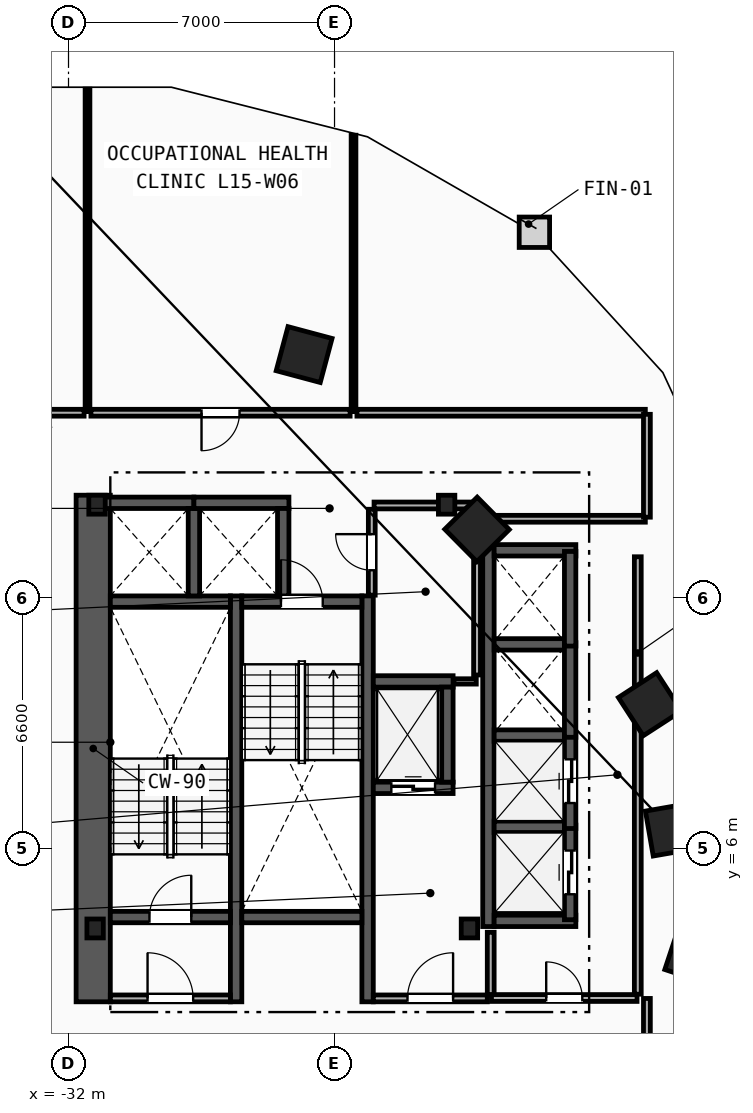
"""IFC4 building model, lengths in metres.
Left out: names, types, materials, properties, quantities, classifications, styles, units other than length and angle.
Written with IfcOpenShell. Run it as: python <this file> out.ifc"""

import sys

from ifc_helpers import new_model, si_unit, direction, frame, frame_2d, origin, origin_2d, place, context, subcontext, project, spatial, rectangle, i_section, extrude, element, fill, save


model = new_model("IFC4")
c1 = context("Model", 3, precision=1e-05, world=origin(), true_north=direction((0.0, 1.0)))
c2 = subcontext(c1, "Body", "Model", "MODEL_VIEW")
j1 = project(units=[si_unit("LENGTHUNIT", "METRE"), si_unit("PLANEANGLEUNIT", "RADIAN")], contexts=[c1])
p1 = place(None, origin())
s1 = spatial("IfcSite", under=j1, at=p1, CompositionType="ELEMENT")
p2 = place(p1, origin())
s2 = spatial("IfcBuilding", under=s1, at=p2, CompositionType="ELEMENT")
p3 = place(p2, frame((0.0, 0.0, 62.0)))
s3 = spatial("IfcBuildingStorey", under=s2, at=p3, CompositionType="ELEMENT", Elevation=62.0)
for number, where, z_axis, x_axis in (
    (1, (-31.3, 3.9, 0.0), (0.0, 0.0, 1.0), (1.0, 0.0, 0.0)),
    (2, (-21.45, 3.9, 0.0), (0.0, 0.0, 1.0), (1.0, 0.0, 0.0)),
    (3, (-22.05, 15.05, 0.0), (0.0, 0.0, 1.0), (1.0, 0.0, 0.0)),
    (4, (-31.25, 15.05, 0.0), (0.0, 0.0, 1.0), (1.0, 0.0, 0.0)),
):
    element("IfcColumn", number, at=place(p3, frame(where, z_axis=z_axis, x_axis=x_axis)), inside=s3, PredefinedType="COLUMN", context=c2, shape_type="SweptSolid", body=[
        extrude(i_section(OverallWidth=0.432, OverallDepth=0.498, WebThickness=0.056, FlangeThickness=0.089, FilletRadius=0.018, at=origin_2d()), origin(), (0.0, 0.0, 1.0), 3.8),
    ])
for number, where, z_axis, x_axis in (
    (5, (-15.55, 3.2, 0.0), (0.0, 0.0, 1.0), (0.315, 0.949, 0.0)),
    (6, (-16.125, 6.5, 0.0), (0.0, 0.0, 1.0), (-0.172, 0.985, 0.0)),
    (7, (-16.7, 9.8, 0.0), (0.0, 0.0, 1.0), (-0.544, 0.839, 0.0)),
    (8, (-21.25, 14.4, 0.0), (0.0, 0.0, 1.0), (-0.703, 0.711, 0.0)),
    (9, (-25.8, 19.0, 0.0), (0.0, 0.0, 1.0), (-0.966, 0.259, 0.0)),
):
    element("IfcColumn", number, at=place(p3, frame(where, z_axis=z_axis, x_axis=x_axis)), inside=s3, PredefinedType="COLUMN", context=c2, shape_type="SweptSolid", body=[
        extrude(rectangle(XDim=1.2, YDim=1.2, at=origin_2d()), origin(), (0.0, 0.0, 1.0), 3.8),
    ])
p4 = place(p3, frame((-31.35, 1.97, 0.0), z_axis=(0.0, 0.0, 1.0), x_axis=(0.0, 1.0, 0.0)))
e10 = element("IfcWall", 10, at=p4, inside=s3, PredefinedType="SHEAR", context=c2, shape_type="SweptSolid", body=[
    extrude(rectangle(XDim=13.33, YDim=0.9, at=frame_2d((6.665, 0.0))), origin(), (0.0, 0.0, 1.0), 3.5),
])
for number, where, z_axis, x_axis in (
    (11, (-27.59, 1.97, 0.0), (0.0, 0.0, 1.0), (0.0, 1.0, 0.0)),
    (12, (-24.13, 1.97, 0.0), (0.0, 0.0, 1.0), (0.0, 1.0, 0.0)),
):
    element("IfcWall", number, at=place(p3, frame(where, z_axis=z_axis, x_axis=x_axis)), inside=s3, PredefinedType="SHEAR", context=c2, shape_type="SweptSolid", body=[
        extrude(rectangle(XDim=10.68, YDim=0.3, at=frame_2d((5.34, 0.0))), origin(), (0.0, 0.0, 1.0), 3.5),
    ])
p5 = place(p3, frame((-30.9, 4.2, 0.0), z_axis=(0.0, 0.0, 1.0), x_axis=(1.0, 0.0, 0.0)))
e13 = element("IfcWall", 13, at=p5, inside=s3, PredefinedType="SHEAR", context=c2, shape_type="SweptSolid", body=[
    extrude(rectangle(XDim=3.16, YDim=0.3, at=frame_2d((1.58, 0.0))), origin(), (0.0, 0.0, 1.0), 3.5),
])
p6 = place(p5, frame((1.03, 0.0, 0.0)))
e14 = element("IfcOpeningElement", 14, at=p6, cuts=e13, PredefinedType="OPENING", context=c2, shape_type="SweptSolid", body=[
    extrude(rectangle(XDim=1.1, YDim=2.15, at=frame_2d((0.55, 1.075))), frame((0.0, 0.16, 0.0), z_axis=(0.0, -1.0, 0.0), x_axis=(1.0, 0.0, 0.0)), (0.0, 0.0, 1.0), 0.32),
])
p7 = place(p3, frame((-30.9, 12.5, 0.0), z_axis=(0.0, 0.0, 1.0), x_axis=(1.0, 0.0, 0.0)))
e15 = element("IfcWall", 15, at=p7, inside=s3, PredefinedType="SHEAR", context=c2, shape_type="SweptSolid", body=[
    extrude(rectangle(XDim=3.16, YDim=0.3, at=frame_2d((1.58, 0.0))), origin(), (0.0, 0.0, 1.0), 3.5),
])
p8 = place(p3, frame((-27.44, 12.5, 0.0), z_axis=(0.0, 0.0, 1.0), x_axis=(1.0, 0.0, 0.0)))
e16 = element("IfcWall", 16, at=p8, inside=s3, PredefinedType="SHEAR", context=c2, shape_type="SweptSolid", body=[
    extrude(rectangle(XDim=3.16, YDim=0.3, at=frame_2d((1.58, 0.0))), origin(), (0.0, 0.0, 1.0), 3.5),
])
p9 = place(p8, frame((1.03, 0.0, 0.0)))
e17 = element("IfcOpeningElement", 17, at=p9, cuts=e16, PredefinedType="OPENING", context=c2, shape_type="SweptSolid", body=[
    extrude(rectangle(XDim=1.1, YDim=2.15, at=frame_2d((0.55, 1.075))), frame((0.0, 0.16, 0.0), z_axis=(0.0, -1.0, 0.0), x_axis=(1.0, 0.0, 0.0)), (0.0, 0.0, 1.0), 0.32),
])
p10 = place(p3, frame((-27.44, 4.2, 0.0), z_axis=(0.0, 0.0, 1.0), x_axis=(1.0, 0.0, 0.0)))
e18 = element("IfcWall", 18, at=p10, inside=s3, PredefinedType="SHEAR", context=c2, shape_type="SweptSolid", body=[
    extrude(rectangle(XDim=3.16, YDim=0.3, at=frame_2d((1.58, 0.0))), origin(), (0.0, 0.0, 1.0), 3.5),
])
p11 = place(p3, frame((-20.89, 2.15, 0.0), z_axis=(0.0, 0.0, 1.0), x_axis=(0.0, 1.0, 0.0)))
e19 = element("IfcWall", 19, at=p11, inside=s3, PredefinedType="PARTITIONING", context=c2, shape_type="SweptSolid", body=[
    extrude(rectangle(XDim=1.65, YDim=0.18, at=frame_2d((0.825, 0.0))), origin(), (0.0, 0.0, 1.0), 3.5),
])
p12 = place(p3, frame((-23.98, 2.06, 0.0), z_axis=(0.0, 0.0, 1.0), x_axis=(1.0, 0.0, 0.0)))
e20 = element("IfcWall", 20, at=p12, inside=s3, PredefinedType="PARTITIONING", context=c2, shape_type="SweptSolid", body=[
    extrude(rectangle(XDim=3.0, YDim=0.18, at=frame_2d((1.5, 0.0))), origin(), (0.0, 0.0, 1.0), 3.5),
])
p13 = place(p12, frame((0.9, 0.0, 0.0)))
e21 = element("IfcOpeningElement", 21, at=p13, cuts=e20, PredefinedType="OPENING", context=c2, shape_type="SweptSolid", body=[
    extrude(rectangle(XDim=1.2, YDim=2.15, at=frame_2d((0.6, 1.075))), frame((0.0, 0.1, 0.0), z_axis=(0.0, -1.0, 0.0), x_axis=(1.0, 0.0, 0.0)), (0.0, 0.0, 1.0), 0.2),
])
p14 = place(p3, frame((-30.9, 2.06, 0.0), z_axis=(0.0, 0.0, 1.0), x_axis=(1.0, 0.0, 0.0)))
e22 = element("IfcWall", 22, at=p14, inside=s3, PredefinedType="PARTITIONING", context=c2, shape_type="SweptSolid", body=[
    extrude(rectangle(XDim=3.16, YDim=0.18, at=frame_2d((1.58, 0.0))), origin(), (0.0, 0.0, 1.0), 3.5),
])
p15 = place(p14, frame((0.98, 0.0, 0.0)))
e23 = element("IfcOpeningElement", 23, at=p15, cuts=e22, PredefinedType="OPENING", context=c2, shape_type="SweptSolid", body=[
    extrude(rectangle(XDim=1.2, YDim=2.15, at=frame_2d((0.6, 1.075))), frame((0.0, 0.1, 0.0), z_axis=(0.0, -1.0, 0.0), x_axis=(1.0, 0.0, 0.0)), (0.0, 0.0, 1.0), 0.2),
])
p16 = place(p3, frame((-23.98, 7.6, 0.0), z_axis=(0.0, 0.0, 1.0), x_axis=(1.0, 0.0, 0.0)))
e24 = element("IfcWall", 24, at=p16, inside=s3, PredefinedType="SHEAR", context=c2, shape_type="SweptSolid", body=[
    extrude(rectangle(XDim=2.1, YDim=0.3, at=frame_2d((1.05, 0.0))), origin(), (0.0, 0.0, 1.0), 3.5),
])
p17 = place(p16, frame((0.475, 0.0, 0.0)))
e25 = element("IfcOpeningElement", 25, at=p17, cuts=e24, PredefinedType="OPENING", context=c2, shape_type="SweptSolid", body=[
    extrude(rectangle(XDim=1.15, YDim=2.2, at=frame_2d((0.575, 1.1))), frame((0.0, 0.16, 0.0), z_axis=(0.0, -1.0, 0.0), x_axis=(1.0, 0.0, 0.0)), (0.0, 0.0, 1.0), 0.32),
])
p18 = place(p3, frame((-23.98, 10.4, 0.0), z_axis=(0.0, 0.0, 1.0), x_axis=(1.0, 0.0, 0.0)))
e26 = element("IfcWall", 26, at=p18, inside=s3, PredefinedType="SHEAR", context=c2, shape_type="SweptSolid", body=[
    extrude(rectangle(XDim=2.1, YDim=0.3, at=frame_2d((1.05, 0.0))), origin(), (0.0, 0.0, 1.0), 3.5),
])
for number, where, z_axis, x_axis in (
    (27, (-22.03, 7.75, 0.0), (0.0, 0.0, 1.0), (0.0, 1.0, 0.0)),
    (28, (-31.2, 15.1, 0.0), (0.0, 0.0, 1.0), (1.0, 0.0, 0.0)),
):
    element("IfcWall", number, at=place(p3, frame(where, z_axis=z_axis, x_axis=x_axis)), inside=s3, PredefinedType="SHEAR", context=c2, shape_type="SweptSolid", body=[
        extrude(rectangle(XDim=2.5, YDim=0.3, at=frame_2d((1.25, 0.0))), origin(), (0.0, 0.0, 1.0), 3.5),
    ])
p19 = place(p3, frame((-28.7, 12.65, 0.0), z_axis=(0.0, 0.0, 1.0), x_axis=(0.0, 1.0, 0.0)))
e29 = element("IfcWall", 29, at=p19, inside=s3, PredefinedType="SHEAR", context=c2, shape_type="SweptSolid", body=[
    extrude(rectangle(XDim=2.3, YDim=0.3, at=frame_2d((1.15, 0.0))), origin(), (0.0, 0.0, 1.0), 3.5),
])
p20 = place(p3, frame((-28.7, 15.1, 0.0), z_axis=(0.0, 0.0, 1.0), x_axis=(1.0, 0.0, 0.0)))
e30 = element("IfcWall", 30, at=p20, inside=s3, PredefinedType="SHEAR", context=c2, shape_type="SweptSolid", body=[
    extrude(rectangle(XDim=2.5, YDim=0.3, at=frame_2d((1.25, 0.0))), origin(), (0.0, 0.0, 1.0), 3.5),
])
p21 = place(p3, frame((-26.35, 12.65, 0.0), z_axis=(0.0, 0.0, 1.0), x_axis=(0.0, 1.0, 0.0)))
e31 = element("IfcWall", 31, at=p21, inside=s3, PredefinedType="SHEAR", context=c2, shape_type="SweptSolid", body=[
    extrude(rectangle(XDim=2.3, YDim=0.3, at=frame_2d((1.15, 0.0))), origin(), (0.0, 0.0, 1.0), 3.5),
])
p22 = place(p3, frame((-20.95, 3.95, 0.0), z_axis=(0.0, 0.0, 1.0), x_axis=(0.0, 1.0, 0.0)))
e32 = element("IfcWall", 32, at=p22, inside=s3, PredefinedType="SHEAR", context=c2, shape_type="SweptSolid", body=[
    extrude(rectangle(XDim=10.05, YDim=0.3, at=frame_2d((5.025, 0.0))), origin(), (0.0, 0.0, 1.0), 3.5),
])
for number, where, z_axis, x_axis in (
    (33, (-20.8, 4.1, 0.0), (0.0, 0.0, 1.0), (1.0, 0.0, 0.0)),
    (34, (-20.8, 13.85, 0.0), (0.0, 0.0, 1.0), (1.0, 0.0, 0.0)),
):
    element("IfcWall", number, at=place(p3, frame(where, z_axis=z_axis, x_axis=x_axis)), inside=s3, PredefinedType="SHEAR", context=c2, shape_type="SweptSolid", body=[
        extrude(rectangle(XDim=2.15, YDim=0.3, at=frame_2d((1.075, 0.0))), origin(), (0.0, 0.0, 1.0), 3.5),
    ])
for number, where, z_axis, x_axis in (
    (35, (-20.8, 6.575, 0.0), (0.0, 0.0, 1.0), (1.0, 0.0, 0.0)),
    (36, (-20.8, 8.975, 0.0), (0.0, 0.0, 1.0), (1.0, 0.0, 0.0)),
    (37, (-20.8, 11.375, 0.0), (0.0, 0.0, 1.0), (1.0, 0.0, 0.0)),
):
    element("IfcWall", number, at=place(p3, frame(where, z_axis=z_axis, x_axis=x_axis)), inside=s3, PredefinedType="SHEAR", context=c2, shape_type="SweptSolid", body=[
        extrude(rectangle(XDim=1.85, YDim=0.3, at=frame_2d((0.925, 0.0))), origin(), (0.0, 0.0, 1.0), 3.5),
    ])
p23 = place(p3, frame((-18.8, 4.13, 0.0), z_axis=(0.0, 0.0, 1.0), x_axis=(0.0, 1.0, 0.0)))
e38 = element("IfcWall", 38, at=p23, inside=s3, PredefinedType="SHEAR", context=c2, shape_type="SweptSolid", body=[
    extrude(rectangle(XDim=2.49, YDim=0.3, at=frame_2d((1.245, 0.0))), origin(), (0.0, 0.0, 1.0), 3.5),
])
p24 = place(p23, frame((0.67, 0.0, 0.0)))
e39 = element("IfcOpeningElement", 39, at=p24, cuts=e38, PredefinedType="OPENING", context=c2, shape_type="SweptSolid", body=[
    extrude(rectangle(XDim=1.15, YDim=2.2, at=frame_2d((0.575, 1.1))), frame((0.0, 0.16, 0.0), z_axis=(0.0, -1.0, 0.0), x_axis=(1.0, 0.0, 0.0)), (0.0, 0.0, 1.0), 0.32),
])
p25 = place(p3, frame((-18.8, 6.53, 0.0), z_axis=(0.0, 0.0, 1.0), x_axis=(0.0, 1.0, 0.0)))
e40 = element("IfcWall", 40, at=p25, inside=s3, PredefinedType="SHEAR", context=c2, shape_type="SweptSolid", body=[
    extrude(rectangle(XDim=2.49, YDim=0.3, at=frame_2d((1.245, 0.0))), origin(), (0.0, 0.0, 1.0), 3.5),
])
p26 = place(p25, frame((0.67, 0.0, 0.0)))
e41 = element("IfcOpeningElement", 41, at=p26, cuts=e40, PredefinedType="OPENING", context=c2, shape_type="SweptSolid", body=[
    extrude(rectangle(XDim=1.15, YDim=2.2, at=frame_2d((0.575, 1.1))), frame((0.0, 0.16, 0.0), z_axis=(0.0, -1.0, 0.0), x_axis=(1.0, 0.0, 0.0)), (0.0, 0.0, 1.0), 0.32),
])
for number, where, z_axis, x_axis in (
    (42, (-18.8, 8.93, 0.0), (0.0, 0.0, 1.0), (0.0, 1.0, 0.0)),
    (43, (-18.8, 11.33, 0.0), (0.0, 0.0, 1.0), (0.0, 1.0, 0.0)),
):
    element("IfcWall", number, at=place(p3, frame(where, z_axis=z_axis, x_axis=x_axis)), inside=s3, PredefinedType="SHEAR", context=c2, shape_type="SweptSolid", body=[
        extrude(rectangle(XDim=2.49, YDim=0.3, at=frame_2d((1.245, 0.0))), origin(), (0.0, 0.0, 1.0), 3.5),
    ])
p27 = place(p3, frame((-17.02, 2.17, 0.0), z_axis=(0.0, 0.0, 1.0), x_axis=(0.0, 1.0, 0.0)))
e44 = element("IfcWall", 44, at=p27, inside=s3, PredefinedType="PARTITIONING", context=c2, shape_type="SweptSolid", body=[
    extrude(rectangle(XDim=11.51, YDim=0.18, at=frame_2d((5.755, 0.0))), origin(), (0.0, 0.0, 1.0), 3.5),
])
p28 = place(p3, frame((-20.87, 2.07, 0.0), z_axis=(0.0, 0.0, 1.0), x_axis=(1.0, 0.0, 0.0)))
e45 = element("IfcWall", 45, at=p28, inside=s3, PredefinedType="PARTITIONING", context=c2, shape_type="SweptSolid", body=[
    extrude(rectangle(XDim=3.83, YDim=0.18, at=frame_2d((1.915, 0.0))), origin(), (0.0, 0.0, 1.0), 3.5),
])
p29 = place(p28, frame((1.44, 0.0, 0.0)))
e46 = element("IfcOpeningElement", 46, at=p29, cuts=e45, PredefinedType="OPENING", context=c2, shape_type="SweptSolid", body=[
    extrude(rectangle(XDim=0.95, YDim=2.1, at=frame_2d((0.475, 1.05))), frame((0.0, 0.1, 0.0), z_axis=(0.0, -1.0, 0.0), x_axis=(1.0, 0.0, 0.0)), (0.0, 0.0, 1.0), 0.2),
])
p30 = place(p3, frame((-21.86, 10.4, 0.0), z_axis=(0.0, 0.0, 1.0), x_axis=(1.0, 0.0, 0.0)))
e47 = element("IfcWall", 47, at=p30, inside=s3, PredefinedType="PARTITIONING", context=c2, shape_type="SweptSolid", body=[
    extrude(rectangle(XDim=0.59, YDim=0.14, at=frame_2d((0.295, 0.0))), origin(), (0.0, 0.0, 1.0), 3.5),
])
p31 = place(p3, frame((-21.25, 10.57, 0.0), z_axis=(0.0, 0.0, 1.0), x_axis=(0.0, 1.0, 0.0)))
e48 = element("IfcWall", 48, at=p31, inside=s3, PredefinedType="PARTITIONING", context=c2, shape_type="SweptSolid", body=[
    extrude(rectangle(XDim=4.36, YDim=0.18, at=frame_2d((2.18, 0.0))), origin(), (0.0, 0.0, 1.0), 3.5),
])
p32 = place(p3, frame((-23.96, 15.03, 0.0), z_axis=(0.0, 0.0, 1.0), x_axis=(1.0, 0.0, 0.0)))
e49 = element("IfcWall", 49, at=p32, inside=s3, PredefinedType="PARTITIONING", context=c2, shape_type="SweptSolid", body=[
    extrude(rectangle(XDim=2.61, YDim=0.18, at=frame_2d((1.305, 0.0))), origin(), (0.0, 0.0, 1.0), 2.573),
])
p33 = place(p3, frame((-24.02, 12.67, 0.0), z_axis=(0.0, 0.0, 1.0), x_axis=(0.0, 1.0, 0.0)))
e50 = element("IfcWall", 50, at=p33, inside=s3, PredefinedType="PARTITIONING", context=c2, shape_type="SweptSolid", body=[
    extrude(rectangle(XDim=2.26, YDim=0.18, at=frame_2d((1.13, 0.0))), origin(), (0.0, 0.0, 1.0), 3.5),
])
p34 = place(p33, frame((0.655, 0.0, 0.0)))
e51 = element("IfcOpeningElement", 51, at=p34, cuts=e50, PredefinedType="OPENING", context=c2, shape_type="SweptSolid", body=[
    extrude(rectangle(XDim=0.95, YDim=2.1, at=frame_2d((0.475, 1.05))), frame((0.0, 0.1, 0.0), z_axis=(0.0, -1.0, 0.0), x_axis=(1.0, 0.0, 0.0)), (0.0, 0.0, 1.0), 0.2),
])
p35 = place(p3, frame((-31.5, 17.5, 0.0), z_axis=(0.0, 0.0, 1.0), x_axis=(0.0, 1.0, 0.0)))
e52 = element("IfcWall", 52, at=p35, inside=s3, PredefinedType="PARTITIONING", context=c2, shape_type="SweptSolid", body=[
    extrude(rectangle(XDim=8.485, YDim=0.125, at=frame_2d((4.243, 0.0))), origin(), (0.0, 0.0, 1.0), 3.5),
])
p36 = place(p3, frame((-24.5, 17.5, 0.0), z_axis=(0.0, 0.0, 1.0), x_axis=(0.0, 1.0, 0.0)))
e53 = element("IfcWall", 53, at=p36, inside=s3, PredefinedType="PARTITIONING", context=c2, shape_type="SweptSolid", body=[
    extrude(rectangle(XDim=7.272, YDim=0.125, at=frame_2d((3.636, 0.0))), origin(), (0.0, 0.0, 1.0), 3.5),
])
p37 = place(p3, frame((-16.822, 17.47, 0.0), z_axis=(0.0, 0.0, 1.0), x_axis=(-1.0, 0.0, 0.0)))
e54 = element("IfcWall", 54, at=p37, inside=s3, PredefinedType="PARTITIONING", context=c2, shape_type="SweptSolid", body=[
    extrude(rectangle(XDim=7.588, YDim=0.18, at=frame_2d((3.794, 0.0))), origin(), (0.0, 0.0, 1.0), 3.5),
])
p38 = place(p3, frame((-21.178, 14.68, 0.0), z_axis=(0.0, 0.0, 1.0), x_axis=(1.0, 0.0, 0.0)))
e55 = element("IfcWall", 55, at=p38, inside=s3, PredefinedType="PARTITIONING", context=c2, shape_type="SweptSolid", body=[
    extrude(rectangle(XDim=4.357, YDim=0.18, at=frame_2d((2.178, 0.0))), origin(), (0.0, 0.0, 1.0), 3.5),
])
p39 = place(p3, frame((-16.78, 14.721, 0.0), z_axis=(0.0, 0.0, 1.0), x_axis=(0.0, 1.0, 0.0)))
e56 = element("IfcWall", 56, at=p39, inside=s3, PredefinedType="PARTITIONING", context=c2, shape_type="SweptSolid", body=[
    extrude(rectangle(XDim=2.707, YDim=0.18, at=frame_2d((1.354, 0.0))), origin(), (0.0, 0.0, 1.0), 3.5),
])
p40 = place(p3, frame((-16.78, -0.329, 0.0), z_axis=(0.0, 0.0, 1.0), x_axis=(0.0, 1.0, 0.0)))
e57 = element("IfcWall", 57, at=p40, inside=s3, PredefinedType="PARTITIONING", context=c2, shape_type="SweptSolid", body=[
    extrude(rectangle(XDim=2.387, YDim=0.18, at=frame_2d((1.194, 0.0))), origin(), (0.0, 0.0, 1.0), 3.5),
])
p41 = place(p3, frame((-31.59, 17.47, 0.0), z_axis=(0.0, 0.0, 1.0), x_axis=(-1.0, 0.0, 0.0)))
e58 = element("IfcWall", 58, at=p41, inside=s3, PredefinedType="PARTITIONING", context=c2, shape_type="SweptSolid", body=[
    extrude(rectangle(XDim=2.038, YDim=0.18, at=frame_2d((1.019, 0.0))), origin(), (0.0, 0.0, 1.0), 3.5),
])
p42 = place(p3, frame((-24.59, 17.47, 0.0), z_axis=(0.0, 0.0, 1.0), x_axis=(-1.0, 0.0, 0.0)))
e59 = element("IfcWall", 59, at=p42, inside=s3, PredefinedType="PARTITIONING", context=c2, shape_type="SweptSolid", body=[
    extrude(rectangle(XDim=6.82, YDim=0.18, at=frame_2d((3.41, 0.0))), origin(), (0.0, 0.0, 1.0), 3.5),
])
p43 = place(p42, frame((2.91, 0.0, 0.0)))
e60 = element("IfcOpeningElement", 60, at=p43, cuts=e59, PredefinedType="OPENING", context=c2, shape_type="SweptSolid", body=[
    extrude(rectangle(XDim=1.0, YDim=2.15, at=frame_2d((0.5, 1.075))), frame((0.0, 0.1, 0.0), z_axis=(0.0, -1.0, 0.0), x_axis=(1.0, 0.0, 0.0)), (0.0, 0.0, 1.0), 0.2),
])
p44 = place(p6, origin())
e61 = element("IfcDoor", 61, at=p44, inside=s3, OperationType="SINGLE_SWING_RIGHT", PredefinedType="DOOR", context=c2, shape_type="SweptSolid", body=[
    extrude(rectangle(XDim=1.1, YDim=2.15, at=frame_2d((0.55, 1.075))), frame((0.0, 0.025, 0.0), z_axis=(0.0, -1.0, 0.0), x_axis=(1.0, 0.0, 0.0)), (0.0, 0.0, 1.0), 0.05),
])
fill(e14, e61)
p45 = place(p9, origin())
e62 = element("IfcDoor", 62, at=p45, inside=s3, OperationType="SINGLE_SWING_LEFT", PredefinedType="DOOR", context=c2, shape_type="SweptSolid", body=[
    extrude(rectangle(XDim=1.1, YDim=2.15, at=frame_2d((0.55, 1.075))), frame((0.0, 0.025, 0.0), z_axis=(0.0, -1.0, 0.0), x_axis=(1.0, 0.0, 0.0)), (0.0, 0.0, 1.0), 0.05),
])
fill(e17, e62)
p46 = place(p13, origin())
e63 = element("IfcDoor", 63, at=p46, inside=s3, OperationType="SINGLE_SWING_RIGHT", PredefinedType="DOOR", context=c2, shape_type="SweptSolid", body=[
    extrude(rectangle(XDim=1.2, YDim=2.15, at=frame_2d((0.6, 1.075))), frame((0.0, 0.025, 0.0), z_axis=(0.0, -1.0, 0.0), x_axis=(1.0, 0.0, 0.0)), (0.0, 0.0, 1.0), 0.05),
])
fill(e21, e63)
p47 = place(p15, origin())
e64 = element("IfcDoor", 64, at=p47, inside=s3, OperationType="SINGLE_SWING_LEFT", PredefinedType="DOOR", context=c2, shape_type="SweptSolid", body=[
    extrude(rectangle(XDim=1.2, YDim=2.15, at=frame_2d((0.6, 1.075))), frame((0.0, 0.025, 0.0), z_axis=(0.0, -1.0, 0.0), x_axis=(1.0, 0.0, 0.0)), (0.0, 0.0, 1.0), 0.05),
])
fill(e23, e64)
p48 = place(p17, origin())
e65 = element("IfcDoor", 65, at=p48, inside=s3, OperationType="SLIDING_TO_LEFT", PredefinedType="TRAPDOOR", context=c2, shape_type="SweptSolid", body=[
    extrude(rectangle(XDim=1.15, YDim=2.2, at=frame_2d((0.575, 1.1))), frame((0.0, 0.025, 0.0), z_axis=(0.0, -1.0, 0.0), x_axis=(1.0, 0.0, 0.0)), (0.0, 0.0, 1.0), 0.05),
])
fill(e25, e65)
p49 = place(p24, origin())
e66 = element("IfcDoor", 66, at=p49, inside=s3, OperationType="SLIDING_TO_LEFT", PredefinedType="TRAPDOOR", context=c2, shape_type="SweptSolid", body=[
    extrude(rectangle(XDim=1.15, YDim=2.2, at=frame_2d((0.575, 1.1))), frame((0.0, 0.025, 0.0), z_axis=(0.0, -1.0, 0.0), x_axis=(1.0, 0.0, 0.0)), (0.0, 0.0, 1.0), 0.05),
])
fill(e39, e66)
p50 = place(p26, origin())
e67 = element("IfcDoor", 67, at=p50, inside=s3, OperationType="SLIDING_TO_LEFT", PredefinedType="TRAPDOOR", context=c2, shape_type="SweptSolid", body=[
    extrude(rectangle(XDim=1.15, YDim=2.2, at=frame_2d((0.575, 1.1))), frame((0.0, 0.025, 0.0), z_axis=(0.0, -1.0, 0.0), x_axis=(1.0, 0.0, 0.0)), (0.0, 0.0, 1.0), 0.05),
])
fill(e41, e67)
p51 = place(p43, origin())
e68 = element("IfcDoor", 68, at=p51, inside=s3, OperationType="SINGLE_SWING_RIGHT", PredefinedType="DOOR", context=c2, shape_type="SweptSolid", body=[
    extrude(rectangle(XDim=1.0, YDim=2.15, at=frame_2d((0.5, 1.075))), frame((0.0, 0.025, 0.0), z_axis=(0.0, -1.0, 0.0), x_axis=(1.0, 0.0, 0.0)), (0.0, 0.0, 1.0), 0.05),
])
fill(e60, e68)
p52 = place(p29, origin())
e69 = element("IfcDoor", 69, at=p52, inside=s3, OperationType="SINGLE_SWING_LEFT", PredefinedType="DOOR", context=c2, shape_type="SweptSolid", body=[
    extrude(rectangle(XDim=0.95, YDim=2.1, at=frame_2d((0.475, 1.05))), frame((0.0, 0.025, 0.0), z_axis=(0.0, -1.0, 0.0), x_axis=(1.0, 0.0, 0.0)), (0.0, 0.0, 1.0), 0.05),
])
fill(e46, e69)
p53 = place(p34, origin())
e70 = element("IfcDoor", 70, at=p53, inside=s3, OperationType="SINGLE_SWING_RIGHT", PredefinedType="DOOR", context=c2, shape_type="SweptSolid", body=[
    extrude(rectangle(XDim=0.95, YDim=2.1, at=frame_2d((0.475, 1.05))), frame((0.0, 0.025, 0.0), z_axis=(0.0, -1.0, 0.0), x_axis=(1.0, 0.0, 0.0)), (0.0, 0.0, 1.0), 0.05),
])
fill(e51, e70)
save(model, sys.argv[1])
